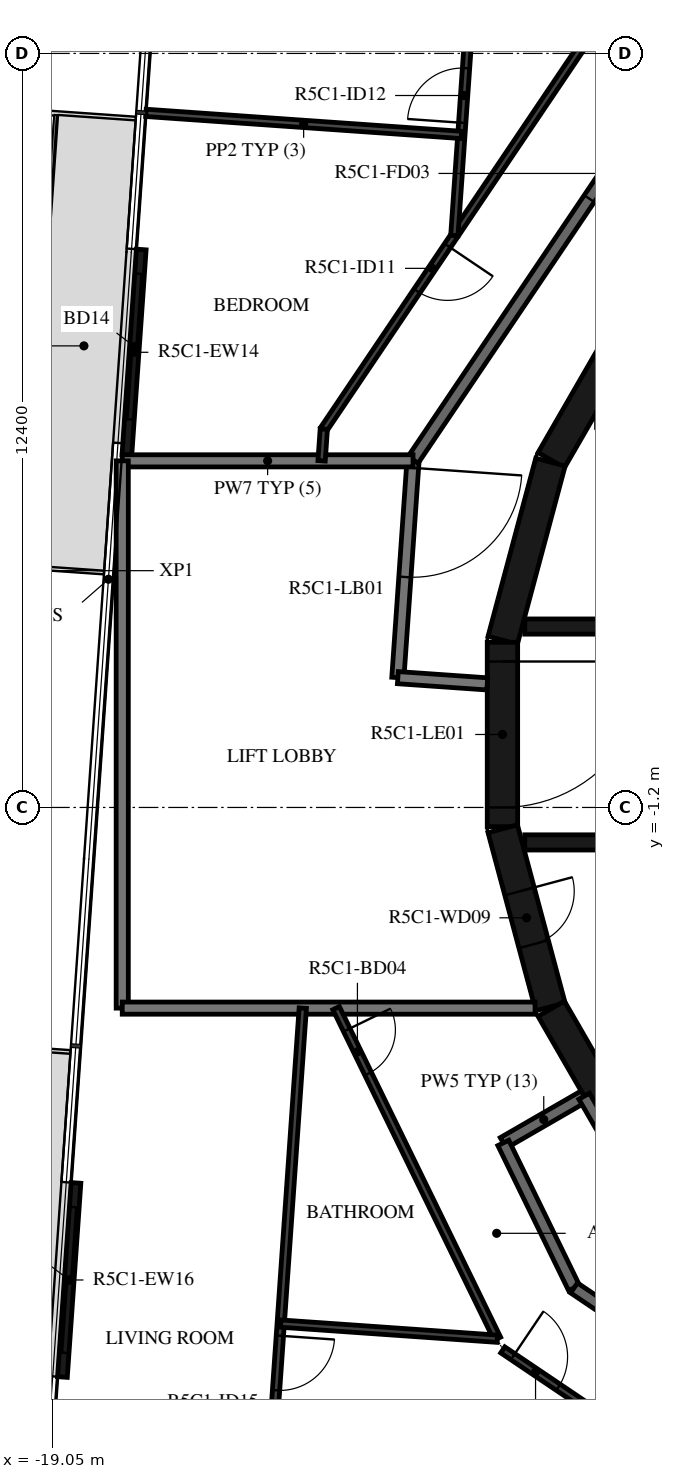
"""IFC4 building model, lengths in metres.
Left out: names, types, materials, properties, quantities, classifications, styles, units other than length and angle.
Written with IfcOpenShell. Run it as: python <this file> out.ifc"""

import sys

from ifc_helpers import new_model, si_unit, direction, frame, frame_2d, origin, place, context, subcontext, project, spatial, rectangle, extrude, element, fill, save


model = new_model("IFC4")
c1 = context("Model", 3, precision=1e-05, world=origin(), true_north=direction((0.0, 1.0)))
c2 = subcontext(c1, "Body", "Model", "MODEL_VIEW")
j1 = project(units=[si_unit("LENGTHUNIT", "METRE"), si_unit("PLANEANGLEUNIT", "RADIAN")], contexts=[c1])
p1 = place(None, origin())
s1 = spatial("IfcSite", under=j1, at=p1, CompositionType="ELEMENT")
p2 = place(p1, origin())
s2 = spatial("IfcBuilding", under=s1, at=p2, CompositionType="ELEMENT")
p3 = place(p2, frame((0.0, 0.0, 212.9)))
s3 = spatial("IfcBuildingStorey", under=s2, at=p3, CompositionType="ELEMENT", Elevation=212.9)
p4 = place(p3, frame((-17.587, 7.975, 0.0), z_axis=(0.0, 0.0, 1.0), x_axis=(-0.069813354682, -0.997560071128, 0.0)))
e1 = element("IfcWall", 1, at=p4, inside=s3, PredefinedType="STANDARD", context=c2, shape_type="SweptSolid", body=[
    extrude(rectangle(XDim=3.389, YDim=0.16, at=frame_2d((1.694, 0.0))), origin(), (0.0, 0.0, 1.0), 3.12),
])
p5 = place(p4, frame((0.4, 0.0, 0.0)))
e2 = element("IfcOpeningElement", 2, at=p5, cuts=e1, PredefinedType="OPENING", context=c2, shape_type="SweptSolid", body=[
    extrude(rectangle(XDim=2.4, YDim=2.4, at=frame_2d((1.2, 1.2))), frame((0.0, 0.09, 0.0), z_axis=(0.0, -1.0, 0.0), x_axis=(1.0, 0.0, 0.0)), (0.0, 0.0, 1.0), 0.18),
])
p6 = place(p3, frame((-18.661, -7.375, 0.0), z_axis=(0.0, 0.0, 1.0), x_axis=(-0.069734222855, -0.997565605944, 0.0)))
e3 = element("IfcWall", 3, at=p6, inside=s3, PredefinedType="STANDARD", context=c2, shape_type="SweptSolid", body=[
    extrude(rectangle(XDim=3.2, YDim=0.16, at=frame_2d((1.6, 0.0))), origin(), (0.0, 0.0, 1.0), 3.12),
])
p7 = place(p6, frame((0.4, 0.0, 0.0)))
e4 = element("IfcOpeningElement", 4, at=p7, cuts=e3, PredefinedType="OPENING", context=c2, shape_type="SweptSolid", body=[
    extrude(rectangle(XDim=2.4, YDim=2.4, at=frame_2d((1.2, 1.2))), frame((0.0, 0.09, 0.0), z_axis=(0.0, -1.0, 0.0), x_axis=(1.0, 0.0, 0.0)), (0.0, 0.0, 1.0), 0.18),
])
for number, where, z_axis, x_axis in (
    (5, (-9.329, 7.137, 0.0), (0.0, 0.0, 1.0), (-0.5, -0.866, 0.0)),
    (6, (-10.858, 4.479, 0.0), (0.0, 0.0, 1.0), (-0.259, -0.966, 0.0)),
):
    element("IfcWall", number, at=place(p3, frame(where, z_axis=z_axis, x_axis=x_axis)), inside=s3, PredefinedType="SHEAR", context=c2, shape_type="SweptSolid", body=[
        extrude(rectangle(XDim=3.033, YDim=0.5, at=frame_2d((1.516, 0.0))), origin(), (0.0, 0.0, 1.0), 3.12),
    ])
p8 = place(p3, frame((-11.647, 1.516, 0.0), z_axis=(0.0, 0.0, 1.0), x_axis=(0.0, -1.0, 0.0)))
e7 = element("IfcWall", 7, at=p8, inside=s3, PredefinedType="SHEAR", context=c2, shape_type="SweptSolid", body=[
    extrude(rectangle(XDim=3.033, YDim=0.5, at=frame_2d((1.516, 0.0))), origin(), (0.0, 0.0, 1.0), 3.12),
])
p9 = place(p8, frame((0.316, 0.0, 0.0)))
e8 = element("IfcOpeningElement", 8, at=p9, cuts=e7, PredefinedType="OPENING", context=c2, shape_type="SweptSolid", body=[
    extrude(rectangle(XDim=2.4, YDim=2.1, at=frame_2d((1.2, 1.05))), frame((0.0, 0.26, 0.0), z_axis=(0.0, -1.0, 0.0), x_axis=(1.0, 0.0, 0.0)), (0.0, 0.0, 1.0), 0.52),
])
p10 = place(p3, frame((-11.643, -1.55, 0.0), z_axis=(0.0, 0.0, 1.0), x_axis=(0.258734743916, -0.965948410781, 0.0)))
e9 = element("IfcWall", 9, at=p10, inside=s3, PredefinedType="SHEAR", context=c2, shape_type="SweptSolid", body=[
    extrude(rectangle(XDim=3.033, YDim=0.5, at=frame_2d((1.516, 0.0))), origin(), (0.0, 0.0, 1.0), 3.12),
])
p11 = place(p10, frame((1.066, 0.0, 0.0)))
e10 = element("IfcOpeningElement", 10, at=p11, cuts=e9, PredefinedType="OPENING", context=c2, shape_type="SweptSolid", body=[
    extrude(rectangle(XDim=0.9, YDim=2.1, at=frame_2d((0.45, 1.05))), frame((0.0, 0.26, 0.0), z_axis=(0.0, -1.0, 0.0), x_axis=(1.0, 0.0, 0.0)), (0.0, 0.0, 1.0), 0.52),
])
p12 = place(p3, frame((-10.845, -4.51, 0.0), z_axis=(0.0, 0.0, 1.0), x_axis=(0.500087131594, -0.865975092491, 0.0)))
e11 = element("IfcWall", 11, at=p12, inside=s3, PredefinedType="SHEAR", context=c2, shape_type="SweptSolid", body=[
    extrude(rectangle(XDim=3.033, YDim=0.5, at=frame_2d((1.516, 0.0))), origin(), (0.0, 0.0, 1.0), 3.12),
])
p13 = place(p3, frame((-11.28, 1.775, 0.0), z_axis=(0.0, 0.0, 1.0), x_axis=(1.0, 0.0, 0.0)))
e12 = element("IfcWall", 12, at=p13, inside=s3, PredefinedType="SHEAR", context=c2, shape_type="SweptSolid", body=[
    extrude(rectangle(XDim=14.38, YDim=0.25, at=frame_2d((7.19, 0.0))), origin(), (0.0, 0.0, 1.0), 3.12),
])
p14 = place(p13, frame((10.73, 0.0, 0.0)))
e13 = element("IfcOpeningElement", 13, at=p14, cuts=e12, PredefinedType="OPENING", context=c2, shape_type="SweptSolid", body=[
    extrude(rectangle(XDim=1.1, YDim=2.1, at=frame_2d((0.55, 1.05))), frame((0.0, 0.135, 0.0), z_axis=(0.0, -1.0, 0.0), x_axis=(1.0, 0.0, 0.0)), (0.0, 0.0, 1.0), 0.27),
])
p15 = place(p13, frame((12.88, 0.0, 0.0)))
e14 = element("IfcOpeningElement", 14, at=p15, cuts=e12, PredefinedType="OPENING", context=c2, shape_type="SweptSolid", body=[
    extrude(rectangle(XDim=1.1, YDim=2.1, at=frame_2d((0.55, 1.05))), frame((0.0, 0.135, 0.0), z_axis=(0.0, -1.0, 0.0), x_axis=(1.0, 0.0, 0.0)), (0.0, 0.0, 1.0), 0.27),
])
p16 = place(p13, frame((3.305, 0.0, 0.0)))
e15 = element("IfcOpeningElement", 15, at=p16, cuts=e12, PredefinedType="OPENING", context=c2, shape_type="SweptSolid", body=[
    extrude(rectangle(XDim=0.9, YDim=2.1, at=frame_2d((0.45, 1.05))), frame((0.0, 0.135, 0.0), z_axis=(0.0, -1.0, 0.0), x_axis=(1.0, 0.0, 0.0)), (0.0, 0.0, 1.0), 0.27),
])
p17 = place(p13, frame((7.605, 0.0, 0.0)))
e16 = element("IfcOpeningElement", 16, at=p17, cuts=e12, PredefinedType="OPENING", context=c2, shape_type="SweptSolid", body=[
    extrude(rectangle(XDim=0.9, YDim=2.1, at=frame_2d((0.45, 1.05))), frame((0.0, 0.135, 0.0), z_axis=(0.0, -1.0, 0.0), x_axis=(1.0, 0.0, 0.0)), (0.0, 0.0, 1.0), 0.27),
])
p18 = place(p3, frame((-11.28, -1.775, 0.0), z_axis=(0.0, 0.0, 1.0), x_axis=(1.0, 0.0, 0.0)))
e17 = element("IfcWall", 17, at=p18, inside=s3, PredefinedType="SHEAR", context=c2, shape_type="SweptSolid", body=[
    extrude(rectangle(XDim=14.38, YDim=0.25, at=frame_2d((7.19, 0.0))), origin(), (0.0, 0.0, 1.0), 3.12),
])
p19 = place(p18, frame((12.88, 0.0, 0.0)))
e18 = element("IfcOpeningElement", 18, at=p19, cuts=e17, PredefinedType="OPENING", context=c2, shape_type="SweptSolid", body=[
    extrude(rectangle(XDim=1.1, YDim=2.1, at=frame_2d((0.55, 1.05))), frame((0.0, 0.135, 0.0), z_axis=(0.0, -1.0, 0.0), x_axis=(1.0, 0.0, 0.0)), (0.0, 0.0, 1.0), 0.27),
])
p20 = place(p18, frame((8.68, 0.0, 0.0)))
e19 = element("IfcOpeningElement", 19, at=p20, cuts=e17, PredefinedType="OPENING", context=c2, shape_type="SweptSolid", body=[
    extrude(rectangle(XDim=0.9, YDim=2.1, at=frame_2d((0.45, 1.05))), frame((0.0, 0.135, 0.0), z_axis=(0.0, -1.0, 0.0), x_axis=(1.0, 0.0, 0.0)), (0.0, 0.0, 1.0), 0.27),
])
p21 = place(p3, frame((-13.118, 4.5, 0.0), z_axis=(0.0, 0.0, 1.0), x_axis=(-0.069746872611, -0.99756472159, 0.0)))
e20 = element("IfcWall", 20, at=p21, inside=s3, PredefinedType="STANDARD", context=c2, shape_type="SweptSolid", body=[
    extrude(rectangle(XDim=3.574, YDim=0.2, at=frame_2d((1.787, 0.0))), origin(), (0.0, 0.0, 1.0), 3.12),
])
p22 = place(p21, frame((0.115, 0.0, 0.0)))
e21 = element("IfcOpeningElement", 21, at=p22, cuts=e20, PredefinedType="OPENING", context=c2, shape_type="SweptSolid", body=[
    extrude(rectangle(XDim=1.8, YDim=2.1, at=frame_2d((0.9, 1.05))), frame((0.0, 0.11, 0.0), z_axis=(0.0, -1.0, 0.0), x_axis=(1.0, 0.0, 0.0)), (0.0, 0.0, 1.0), 0.22),
])
p23 = place(p3, frame((-13.367, 0.935, 0.0), z_axis=(0.0, 0.0, 1.0), x_axis=(0.997553656289, -0.069904955655, 0.0)))
e22 = element("IfcWall", 22, at=p23, inside=s3, PredefinedType="STANDARD", context=c2, shape_type="SweptSolid", body=[
    extrude(rectangle(XDim=1.474, YDim=0.2, at=frame_2d((0.737, 0.0))), origin(), (0.0, 0.0, 1.0), 3.12),
])
p24 = place(p3, frame((-9.101, 10.47, 0.0), z_axis=(0.0, 0.0, 1.0), x_axis=(-0.559195469534, -0.829035841718, 0.0)))
e23 = element("IfcWall", 23, at=p24, inside=s3, PredefinedType="STANDARD", context=c2, shape_type="SweptSolid", body=[
    extrude(rectangle(XDim=7.181, YDim=0.2, at=frame_2d((3.591, 0.0))), origin(), (0.0, 0.0, 1.0), 3.12),
])
p25 = place(p24, frame((1.0, 0.0, 0.0)))
e24 = element("IfcOpeningElement", 24, at=p25, cuts=e23, PredefinedType="OPENING", context=c2, shape_type="SweptSolid", body=[
    extrude(rectangle(XDim=1.0, YDim=2.1, at=frame_2d((0.5, 1.05))), frame((0.0, 0.11, 0.0), z_axis=(0.0, -1.0, 0.0), x_axis=(1.0, 0.0, 0.0)), (0.0, 0.0, 1.0), 0.22),
])
p26 = place(p3, frame((-10.303, -5.949, 0.0), z_axis=(0.0, 0.0, 1.0), x_axis=(-0.866042588199, -0.499970234539, 0.0)))
e25 = element("IfcWall", 25, at=p26, inside=s3, PredefinedType="STANDARD", context=c2, shape_type="SweptSolid", body=[
    extrude(rectangle(XDim=1.535, YDim=0.2, at=frame_2d((0.768, 0.0))), origin(), (0.0, 0.0, 1.0), 3.12),
])
p27 = place(p3, frame((-11.633, -6.716, 0.0), z_axis=(0.0, 0.0, 1.0), x_axis=(0.438322116278, -0.898817958422, 0.0)))
e26 = element("IfcWall", 26, at=p27, inside=s3, PredefinedType="STANDARD", context=c2, shape_type="SweptSolid", body=[
    extrude(rectangle(XDim=2.654, YDim=0.2, at=frame_2d((1.327, 0.0))), origin(), (0.0, 0.0, 1.0), 3.12),
])
p28 = place(p3, frame((-10.47, -9.101, 0.0), z_axis=(0.0, 0.0, 1.0), x_axis=(0.829035841718, -0.559195469534, 0.0)))
e27 = element("IfcWall", 27, at=p28, inside=s3, PredefinedType="STANDARD", context=c2, shape_type="SweptSolid", body=[
    extrude(rectangle(XDim=7.181, YDim=0.2, at=frame_2d((3.591, 0.0))), origin(), (0.0, 0.0, 1.0), 3.12),
])
p29 = place(p28, frame((2.39, 0.0, 0.0)))
e28 = element("IfcOpeningElement", 28, at=p29, cuts=e27, PredefinedType="OPENING", context=c2, shape_type="SweptSolid", body=[
    extrude(rectangle(XDim=1.0, YDim=2.1, at=frame_2d((0.5, 1.05))), frame((0.0, 0.11, 0.0), z_axis=(0.0, -1.0, 0.0), x_axis=(1.0, 0.0, 0.0)), (0.0, 0.0, 1.0), 0.22),
])
p30 = place(p3, frame((-9.52, -7.305, 0.0), z_axis=(0.0, 0.0, 1.0), x_axis=(-0.500028278809, 0.866009076391, 0.0)))
e29 = element("IfcWall", 29, at=p30, inside=s3, PredefinedType="STANDARD", context=c2, shape_type="SweptSolid", body=[
    extrude(rectangle(XDim=1.566, YDim=0.2, at=frame_2d((0.783, 0.0))), origin(), (0.0, 0.0, 1.0), 3.12),
])
p31 = place(p3, frame((-13.118, 4.5, 0.0), z_axis=(0.0, 0.0, 1.0), x_axis=(-1.0, 0.0, 0.0)))
e30 = element("IfcWall", 30, at=p31, inside=s3, PredefinedType="STANDARD", context=c2, shape_type="SweptSolid", body=[
    extrude(rectangle(XDim=4.782, YDim=0.2, at=frame_2d((2.391, 0.0))), origin(), (0.0, 0.0, 1.0), 3.12),
])
p32 = place(p3, frame((-17.9, 4.5, 0.0), z_axis=(0.0, 0.0, 1.0), x_axis=(0.0, -1.0, 0.0)))
e31 = element("IfcWall", 31, at=p32, inside=s3, PredefinedType="STANDARD", context=c2, shape_type="SweptSolid", body=[
    extrude(rectangle(XDim=9.0, YDim=0.2, at=frame_2d((4.5, 0.0))), origin(), (0.0, 0.0, 1.0), 3.12),
])
p33 = place(p3, frame((-17.9, -4.5, 0.0), z_axis=(0.0, 0.0, 1.0), x_axis=(1.0, 0.0, 0.0)))
e32 = element("IfcWall", 32, at=p33, inside=s3, PredefinedType="STANDARD", context=c2, shape_type="SweptSolid", body=[
    extrude(rectangle(XDim=6.789, YDim=0.2, at=frame_2d((3.394, 0.0))), origin(), (0.0, 0.0, 1.0), 3.12),
])
p34 = place(p3, frame((-10.12, 11.642, 0.0), z_axis=(0.0, 0.0, 1.0), x_axis=(-0.55920080659, -0.829032241779, 0.0)))
e33 = element("IfcWall", 33, at=p34, inside=s3, PredefinedType="PARTITIONING", context=c2, shape_type="SweptSolid", body=[
    extrude(rectangle(XDim=7.985, YDim=0.12, at=frame_2d((3.992, 0.0))), origin(), (0.0, 0.0, 1.0), 3.12),
])
p35 = place(p34, frame((4.346, 0.0, 0.0)))
e34 = element("IfcOpeningElement", 34, at=p35, cuts=e33, PredefinedType="OPENING", context=c2, shape_type="SweptSolid", body=[
    extrude(rectangle(XDim=0.9, YDim=2.1, at=frame_2d((0.45, 1.05))), frame((0.0, 0.07, 0.0), z_axis=(0.0, -1.0, 0.0), x_axis=(1.0, 0.0, 0.0)), (0.0, 0.0, 1.0), 0.14),
])
p36 = place(p3, frame((-14.585, 5.022, 0.0), z_axis=(0.0, 0.0, 1.0), x_axis=(-0.069490327804, -0.997582625321, 0.0)))
e35 = element("IfcWall", 35, at=p36, inside=s3, PredefinedType="PARTITIONING", context=c2, shape_type="SweptSolid", body=[
    extrude(rectangle(XDim=0.523, YDim=0.12, at=frame_2d((0.262, 0.0))), origin(), (0.0, 0.0, 1.0), 3.12),
])
p37 = place(p3, frame((-12.439, 8.204, 0.0), z_axis=(0.0, 0.0, 1.0), x_axis=(0.069750037523, 0.997564500303, 0.0)))
e36 = element("IfcWall", 36, at=p37, inside=s3, PredefinedType="PARTITIONING", context=c2, shape_type="SweptSolid", body=[
    extrude(rectangle(XDim=10.014, YDim=0.12, at=frame_2d((5.007, 0.0))), origin(), (0.0, 0.0, 1.0), 3.12),
])
p38 = place(p37, frame((1.859, 0.0, 0.0)))
e37 = element("IfcOpeningElement", 37, at=p38, cuts=e36, PredefinedType="OPENING", context=c2, shape_type="SweptSolid", body=[
    extrude(rectangle(XDim=0.9, YDim=2.1, at=frame_2d((0.45, 1.05))), frame((0.0, 0.07, 0.0), z_axis=(0.0, -1.0, 0.0), x_axis=(1.0, 0.0, 0.0)), (0.0, 0.0, 1.0), 0.14),
])
p39 = place(p3, frame((-17.51, 10.222, 0.0), z_axis=(0.0, 0.0, 1.0), x_axis=(0.997563184303, -0.069768856397, 0.0)))
e38 = element("IfcWall", 38, at=p39, inside=s3, PredefinedType="PARTITIONING", context=c2, shape_type="SweptSolid", body=[
    extrude(rectangle(XDim=5.2, YDim=0.12, at=frame_2d((2.6, 0.0))), origin(), (0.0, 0.0, 1.0), 2.73),
])
p40 = place(p3, frame((-14.383, -4.5, 0.0), z_axis=(0.0, 0.0, 1.0), x_axis=(0.438393414895, -0.898783185077, 0.0)))
e39 = element("IfcWall", 39, at=p40, inside=s3, PredefinedType="PARTITIONING", context=c2, shape_type="SweptSolid", body=[
    extrude(rectangle(XDim=6.049, YDim=0.12, at=frame_2d((3.024, 0.0))), origin(), (0.0, 0.0, 1.0), 3.12),
])
p41 = place(p40, frame((0.4, 0.0, 0.0)))
e40 = element("IfcOpeningElement", 40, at=p41, cuts=e39, PredefinedType="OPENING", context=c2, shape_type="SweptSolid", body=[
    extrude(rectangle(XDim=0.8, YDim=2.1, at=frame_2d((0.4, 1.05))), frame((0.0, 0.07, 0.0), z_axis=(0.0, -1.0, 0.0), x_axis=(1.0, 0.0, 0.0)), (0.0, 0.0, 1.0), 0.14),
])
p42 = place(p3, frame((-11.642, -10.12, 0.0), z_axis=(0.0, 0.0, 1.0), x_axis=(0.829029427133, -0.559204979365, 0.0)))
e41 = element("IfcWall", 41, at=p42, inside=s3, PredefinedType="PARTITIONING", context=c2, shape_type="SweptSolid", body=[
    extrude(rectangle(XDim=6.904, YDim=0.12, at=frame_2d((3.452, 0.0))), origin(), (0.0, 0.0, 1.0), 3.12),
])
p43 = place(p42, frame((0.2, 0.0, 0.0)))
e42 = element("IfcOpeningElement", 42, at=p43, cuts=e41, PredefinedType="OPENING", context=c2, shape_type="SweptSolid", body=[
    extrude(rectangle(XDim=0.9, YDim=2.1, at=frame_2d((0.45, 1.05))), frame((0.0, 0.07, 0.0), z_axis=(0.0, -1.0, 0.0), x_axis=(1.0, 0.0, 0.0)), (0.0, 0.0, 1.0), 0.14),
])
p44 = place(p42, frame((4.192, 0.0, 0.0)))
e43 = element("IfcOpeningElement", 43, at=p44, cuts=e41, PredefinedType="OPENING", context=c2, shape_type="SweptSolid", body=[
    extrude(rectangle(XDim=0.9, YDim=2.1, at=frame_2d((0.45, 1.05))), frame((0.0, 0.07, 0.0), z_axis=(0.0, -1.0, 0.0), x_axis=(1.0, 0.0, 0.0)), (0.0, 0.0, 1.0), 0.14),
])
p45 = place(p3, frame((-14.931, -4.5, 0.0), z_axis=(0.0, 0.0, 1.0), x_axis=(-0.069751708439, -0.997564383471, 0.0)))
e44 = element("IfcWall", 44, at=p45, inside=s3, PredefinedType="PARTITIONING", context=c2, shape_type="SweptSolid", body=[
    extrude(rectangle(XDim=11.894, YDim=0.12, at=frame_2d((5.947, 0.0))), origin(), (0.0, 0.0, 1.0), 3.12),
])
p46 = place(p45, frame((5.4, 0.0, 0.0)))
e45 = element("IfcOpeningElement", 45, at=p46, cuts=e44, PredefinedType="OPENING", context=c2, shape_type="SweptSolid", body=[
    extrude(rectangle(XDim=0.9, YDim=2.1, at=frame_2d((0.45, 1.05))), frame((0.0, 0.07, 0.0), z_axis=(0.0, -1.0, 0.0), x_axis=(1.0, 0.0, 0.0)), (0.0, 0.0, 1.0), 0.14),
])
p47 = place(p3, frame((-15.294, -9.688, 0.0), z_axis=(0.0, 0.0, 1.0), x_axis=(0.997565819809, -0.069731163391, 0.0)))
e46 = element("IfcWall", 46, at=p47, inside=s3, PredefinedType="PARTITIONING", context=c2, shape_type="SweptSolid", body=[
    extrude(rectangle(XDim=3.571, YDim=0.12, at=frame_2d((1.786, 0.0))), origin(), (0.0, 0.0, 1.0), 3.12),
])
p48 = place(p5, origin())
e47 = element("IfcDoor", 47, at=p48, inside=s3, OperationType="DOUBLE_DOOR_SLIDING", PredefinedType="DOOR", context=c2, shape_type="SweptSolid", body=[
    extrude(rectangle(XDim=2.4, YDim=2.4, at=frame_2d((1.2, 1.2))), frame((0.0, 0.025, 0.0), z_axis=(0.0, -1.0, 0.0), x_axis=(1.0, 0.0, 0.0)), (0.0, 0.0, 1.0), 0.05),
])
fill(e2, e47)
p49 = place(p7, origin())
e48 = element("IfcDoor", 48, at=p49, inside=s3, OperationType="DOUBLE_DOOR_SLIDING", PredefinedType="DOOR", context=c2, shape_type="SweptSolid", body=[
    extrude(rectangle(XDim=2.4, YDim=2.4, at=frame_2d((1.2, 1.2))), frame((0.0, 0.025, 0.0), z_axis=(0.0, -1.0, 0.0), x_axis=(1.0, 0.0, 0.0)), (0.0, 0.0, 1.0), 0.05),
])
fill(e4, e48)
p50 = place(p9, origin())
e49 = element("IfcDoor", 49, at=p50, inside=s3, OperationType="DOUBLE_DOOR_SINGLE_SWING", PredefinedType="DOOR", context=c2, shape_type="SweptSolid", body=[
    extrude(rectangle(XDim=2.4, YDim=2.1, at=frame_2d((1.2, 1.05))), frame((0.0, 0.025, 0.0), z_axis=(0.0, -1.0, 0.0), x_axis=(1.0, 0.0, 0.0)), (0.0, 0.0, 1.0), 0.05),
])
fill(e8, e49)
p51 = place(p11, origin())
e50 = element("IfcDoor", 50, at=p51, inside=s3, OperationType="SINGLE_SWING_LEFT", PredefinedType="DOOR", context=c2, shape_type="SweptSolid", body=[
    extrude(rectangle(XDim=0.9, YDim=2.1, at=frame_2d((0.45, 1.05))), frame((0.0, 0.025, 0.0), z_axis=(0.0, -1.0, 0.0), x_axis=(1.0, 0.0, 0.0)), (0.0, 0.0, 1.0), 0.05),
])
fill(e10, e50)
p52 = place(p25, origin())
e51 = element("IfcDoor", 51, at=p52, inside=s3, OperationType="SINGLE_SWING_LEFT", PredefinedType="DOOR", context=c2, shape_type="SweptSolid", body=[
    extrude(rectangle(XDim=1.0, YDim=2.1, at=frame_2d((0.5, 1.05))), frame((0.0, 0.025, 0.0), z_axis=(0.0, -1.0, 0.0), x_axis=(1.0, 0.0, 0.0)), (0.0, 0.0, 1.0), 0.05),
])
fill(e24, e51)
p53 = place(p35, origin())
e52 = element("IfcDoor", 52, at=p53, inside=s3, OperationType="SINGLE_SWING_LEFT", PredefinedType="DOOR", context=c2, shape_type="SweptSolid", body=[
    extrude(rectangle(XDim=0.9, YDim=2.1, at=frame_2d((0.45, 1.05))), frame((0.0, 0.025, 0.0), z_axis=(0.0, -1.0, 0.0), x_axis=(1.0, 0.0, 0.0)), (0.0, 0.0, 1.0), 0.05),
])
fill(e34, e52)
p54 = place(p38, origin())
e53 = element("IfcDoor", 53, at=p54, inside=s3, OperationType="SINGLE_SWING_LEFT", PredefinedType="DOOR", context=c2, shape_type="SweptSolid", body=[
    extrude(rectangle(XDim=0.9, YDim=2.1, at=frame_2d((0.45, 1.05))), frame((0.0, 0.025, 0.0), z_axis=(0.0, -1.0, 0.0), x_axis=(1.0, 0.0, 0.0)), (0.0, 0.0, 1.0), 0.05),
])
fill(e37, e53)
p55 = place(p41, origin())
e54 = element("IfcDoor", 54, at=p55, inside=s3, OperationType="SINGLE_SWING_RIGHT", PredefinedType="DOOR", context=c2, shape_type="SweptSolid", body=[
    extrude(rectangle(XDim=0.8, YDim=2.1, at=frame_2d((0.4, 1.05))), frame((0.0, 0.025, 0.0), z_axis=(0.0, -1.0, 0.0), x_axis=(1.0, 0.0, 0.0)), (0.0, 0.0, 1.0), 0.05),
])
fill(e40, e54)
p56 = place(p43, origin())
e55 = element("IfcDoor", 55, at=p56, inside=s3, OperationType="SINGLE_SWING_RIGHT", PredefinedType="DOOR", context=c2, shape_type="SweptSolid", body=[
    extrude(rectangle(XDim=0.9, YDim=2.1, at=frame_2d((0.45, 1.05))), frame((0.0, 0.025, 0.0), z_axis=(0.0, -1.0, 0.0), x_axis=(1.0, 0.0, 0.0)), (0.0, 0.0, 1.0), 0.05),
])
fill(e42, e55)
p57 = place(p46, origin())
e56 = element("IfcDoor", 56, at=p57, inside=s3, OperationType="SINGLE_SWING_RIGHT", PredefinedType="DOOR", context=c2, shape_type="SweptSolid", body=[
    extrude(rectangle(XDim=0.9, YDim=2.1, at=frame_2d((0.45, 1.05))), frame((0.0, 0.025, 0.0), z_axis=(0.0, -1.0, 0.0), x_axis=(1.0, 0.0, 0.0)), (0.0, 0.0, 1.0), 0.05),
])
fill(e45, e56)
p58 = place(p22, origin())
e57 = element("IfcDoor", 57, at=p58, inside=s3, OperationType="DOUBLE_DOOR_SINGLE_SWING", PredefinedType="DOOR", context=c2, shape_type="SweptSolid", body=[
    extrude(rectangle(XDim=1.8, YDim=2.1, at=frame_2d((0.9, 1.05))), frame((0.0, 0.025, 0.0), z_axis=(0.0, -1.0, 0.0), x_axis=(1.0, 0.0, 0.0)), (0.0, 0.0, 1.0), 0.05),
])
fill(e21, e57)
save(model, sys.argv[1])
